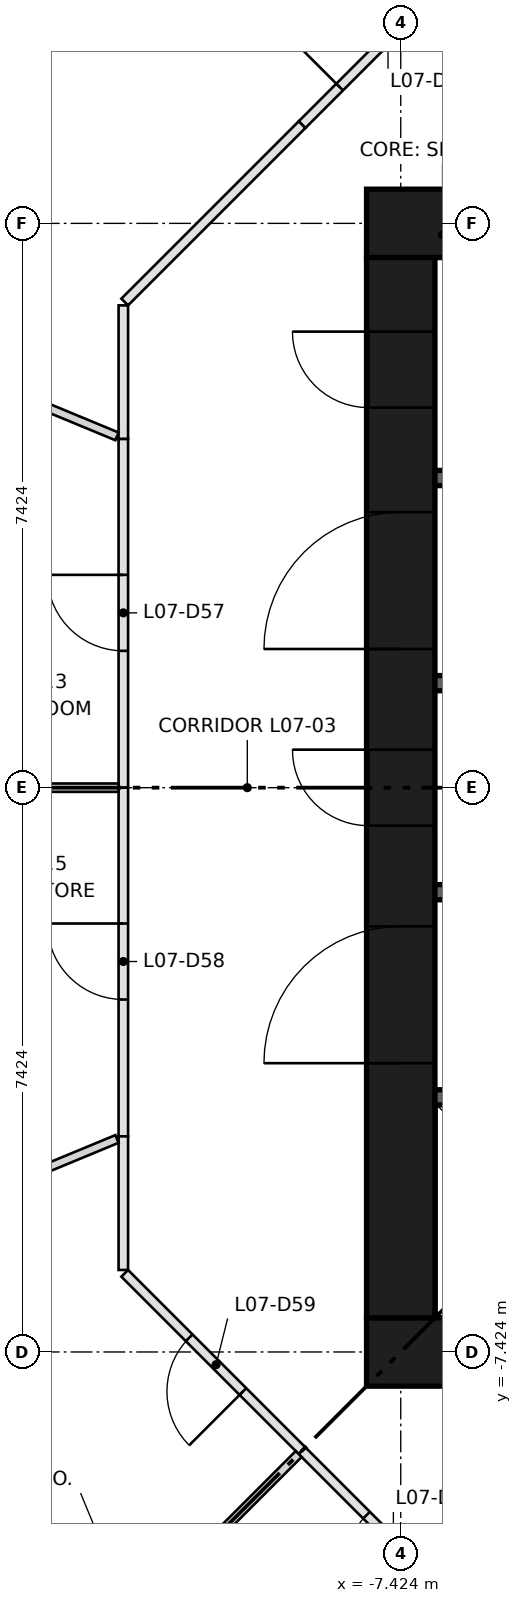
"""IFC4 building model, lengths in metres.
Left out: names, types, materials, properties, quantities, classifications, styles, units other than length and angle.
Written with IfcOpenShell. Run it as: python <this file> out.ifc"""

import sys

from ifc_helpers import new_model, si_unit, direction, frame, frame_2d, origin, place, context, subcontext, project, spatial, rectangle, extrude, element, fill, save


model = new_model("IFC4")
c1 = context("Model", 3, precision=1e-05, world=origin(), true_north=direction((0.0, 1.0)))
c2 = subcontext(c1, "Body", "Model", "MODEL_VIEW")
j1 = project(units=[si_unit("LENGTHUNIT", "METRE"), si_unit("PLANEANGLEUNIT", "RADIAN")], contexts=[c1])
p1 = place(None, origin())
s1 = spatial("IfcSite", under=j1, at=p1, CompositionType="ELEMENT")
p2 = place(p1, origin())
s2 = spatial("IfcBuilding", under=s1, at=p2, CompositionType="ELEMENT")
p3 = place(p2, frame((0.0, 0.0, 29.85)))
s3 = spatial("IfcBuildingStorey", under=s2, at=p3, CompositionType="ELEMENT", Elevation=29.85)
for number, where, z_axis, x_axis in (
    (1, (-7.874, -7.424, 0.0), (0.0, 0.0, 1.0), (1.0, 0.0, 0.0)),
    (2, (-7.874, 7.424, 0.0), (0.0, 0.0, 1.0), (1.0, 0.0, 0.0)),
):
    element("IfcWall", number, at=place(p3, frame(where, z_axis=z_axis, x_axis=x_axis)), inside=s3, PredefinedType="SHEAR", context=c2, shape_type="SweptSolid", body=[
        extrude(rectangle(XDim=15.748, YDim=0.9, at=frame_2d((7.874, 0.0))), origin(), (0.0, 0.0, 1.0), 3.65),
    ])
p4 = place(p3, frame((-7.424, -6.974, 0.0), z_axis=(0.0, 0.0, 1.0), x_axis=(0.0, 1.0, 0.0)))
e3 = element("IfcWall", 3, at=p4, inside=s3, PredefinedType="SHEAR", context=c2, shape_type="SweptSolid", body=[
    extrude(rectangle(XDim=13.948, YDim=0.9, at=frame_2d((6.974, 0.0))), origin(), (0.0, 0.0, 1.0), 3.65),
])
p5 = place(p4, frame((6.474, 0.0, 0.0)))
e4 = element("IfcOpeningElement", 4, at=p5, cuts=e3, PredefinedType="OPENING", context=c2, shape_type="SweptSolid", body=[
    extrude(rectangle(XDim=1.0, YDim=2.1, at=frame_2d((0.5, 1.05))), frame((0.0, 0.46, 0.0), z_axis=(0.0, -1.0, 0.0), x_axis=(1.0, 0.0, 0.0)), (0.0, 0.0, 1.0), 0.92),
])
p6 = place(p4, frame((3.35, 0.0, 0.0)))
e5 = element("IfcOpeningElement", 5, at=p6, cuts=e3, PredefinedType="OPENING", context=c2, shape_type="SweptSolid", body=[
    extrude(rectangle(XDim=1.8, YDim=2.1, at=frame_2d((0.9, 1.05))), frame((0.0, 0.46, 0.0), z_axis=(0.0, -1.0, 0.0), x_axis=(1.0, 0.0, 0.0)), (0.0, 0.0, 1.0), 0.92),
])
p7 = place(p4, frame((8.799, 0.0, 0.0)))
e6 = element("IfcOpeningElement", 6, at=p7, cuts=e3, PredefinedType="OPENING", context=c2, shape_type="SweptSolid", body=[
    extrude(rectangle(XDim=1.8, YDim=2.1, at=frame_2d((0.9, 1.05))), frame((0.0, 0.46, 0.0), z_axis=(0.0, -1.0, 0.0), x_axis=(1.0, 0.0, 0.0)), (0.0, 0.0, 1.0), 0.92),
])
p8 = place(p4, frame((11.974, 0.0, 0.0)))
e7 = element("IfcOpeningElement", 7, at=p8, cuts=e3, PredefinedType="OPENING", context=c2, shape_type="SweptSolid", body=[
    extrude(rectangle(XDim=1.0, YDim=2.1, at=frame_2d((0.5, 1.05))), frame((0.0, 0.46, 0.0), z_axis=(0.0, -1.0, 0.0), x_axis=(1.0, 0.0, 0.0)), (0.0, 0.0, 1.0), 0.92),
])
p9 = place(p3, frame((-6.974, -4.074, 0.0), z_axis=(0.0, 0.0, 1.0), x_axis=(1.0, 0.0, 0.0)))
e8 = element("IfcWall", 8, at=p9, inside=s3, PredefinedType="SHEAR", context=c2, shape_type="SweptSolid", body=[
    extrude(rectangle(XDim=13.948, YDim=0.2, at=frame_2d((6.974, 0.0))), origin(), (0.0, 0.0, 1.0), 3.3),
])
p10 = place(p9, frame((0.918, 0.0, 0.0)))
e9 = element("IfcOpeningElement", 9, at=p10, cuts=e8, PredefinedType="OPENING", context=c2, shape_type="SweptSolid", body=[
    extrude(rectangle(XDim=1.1, YDim=2.1, at=frame_2d((0.55, 1.05))), frame((0.0, 0.11, 0.0), z_axis=(0.0, -1.0, 0.0), x_axis=(1.0, 0.0, 0.0)), (0.0, 0.0, 1.0), 0.22),
])
p11 = place(p9, frame((4.055, 0.0, 0.0)))
e10 = element("IfcOpeningElement", 10, at=p11, cuts=e8, PredefinedType="OPENING", context=c2, shape_type="SweptSolid", body=[
    extrude(rectangle(XDim=1.1, YDim=2.1, at=frame_2d((0.55, 1.05))), frame((0.0, 0.11, 0.0), z_axis=(0.0, -1.0, 0.0), x_axis=(1.0, 0.0, 0.0)), (0.0, 0.0, 1.0), 0.22),
])
p12 = place(p9, frame((6.658, 0.0, 0.0)))
e11 = element("IfcOpeningElement", 11, at=p12, cuts=e8, PredefinedType="OPENING", context=c2, shape_type="SweptSolid", body=[
    extrude(rectangle(XDim=1.0, YDim=2.1, at=frame_2d((0.5, 1.05))), frame((0.0, 0.11, 0.0), z_axis=(0.0, -1.0, 0.0), x_axis=(1.0, 0.0, 0.0)), (0.0, 0.0, 1.0), 0.22),
])
p13 = place(p9, frame((8.627, 0.0, 0.0)))
e12 = element("IfcOpeningElement", 12, at=p13, cuts=e8, PredefinedType="OPENING", context=c2, shape_type="SweptSolid", body=[
    extrude(rectangle(XDim=1.0, YDim=2.1, at=frame_2d((0.5, 1.05))), frame((0.0, 0.11, 0.0), z_axis=(0.0, -1.0, 0.0), x_axis=(1.0, 0.0, 0.0)), (0.0, 0.0, 1.0), 0.22),
])
p14 = place(p9, frame((10.595, 0.0, 0.0)))
e13 = element("IfcOpeningElement", 13, at=p14, cuts=e8, PredefinedType="OPENING", context=c2, shape_type="SweptSolid", body=[
    extrude(rectangle(XDim=1.0, YDim=2.1, at=frame_2d((0.5, 1.05))), frame((0.0, 0.11, 0.0), z_axis=(0.0, -1.0, 0.0), x_axis=(1.0, 0.0, 0.0)), (0.0, 0.0, 1.0), 0.22),
])
p15 = place(p9, frame((12.564, 0.0, 0.0)))
e14 = element("IfcOpeningElement", 14, at=p15, cuts=e8, PredefinedType="OPENING", context=c2, shape_type="SweptSolid", body=[
    extrude(rectangle(XDim=1.0, YDim=2.1, at=frame_2d((0.5, 1.05))), frame((0.0, 0.11, 0.0), z_axis=(0.0, -1.0, 0.0), x_axis=(1.0, 0.0, 0.0)), (0.0, 0.0, 1.0), 0.22),
])
p16 = place(p3, frame((-6.974, 4.074, 0.0), z_axis=(0.0, 0.0, 1.0), x_axis=(1.0, 0.0, 0.0)))
e15 = element("IfcWall", 15, at=p16, inside=s3, PredefinedType="SHEAR", context=c2, shape_type="SweptSolid", body=[
    extrude(rectangle(XDim=6.974, YDim=0.2, at=frame_2d((3.487, 0.0))), origin(), (0.0, 0.0, 1.0), 3.3),
])
for number, where, z_axis, x_axis in (
    (16, (-6.974, -1.375, 0.0), (0.0, 0.0, 1.0), (1.0, 0.0, 0.0)),
    (17, (-6.974, 1.375, 0.0), (0.0, 0.0, 1.0), (1.0, 0.0, 0.0)),
):
    element("IfcWall", number, at=place(p3, frame(where, z_axis=z_axis, x_axis=x_axis)), inside=s3, PredefinedType="SHEAR", context=c2, shape_type="SweptSolid", body=[
        extrude(rectangle(XDim=2.6, YDim=0.2, at=frame_2d((1.3, 0.0))), origin(), (0.0, 0.0, 1.0), 3.3),
    ])
p17 = place(p3, frame((-8.722, 8.722, 0.0), z_axis=(0.0, 0.0, 1.0), x_axis=(0.707069784102, 0.707143776336, 0.0)))
e18 = element("IfcWall", 18, at=p17, inside=s3, PredefinedType="PARTITIONING", context=c2, shape_type="SweptSolid", body=[
    extrude(rectangle(XDim=3.3, YDim=0.125, at=frame_2d((1.65, 0.0))), origin(), (0.0, 0.0, 1.0), 3.3),
])
p18 = place(p17, frame((0.7, 0.0, 0.0)))
e19 = element("IfcOpeningElement", 19, at=p18, cuts=e18, PredefinedType="OPENING", context=c2, shape_type="SweptSolid", body=[
    extrude(rectangle(XDim=1.8, YDim=2.1, at=frame_2d((0.9, 1.05))), frame((0.0, 0.073, 0.0), z_axis=(0.0, -1.0, 0.0), x_axis=(1.0, 0.0, 0.0)), (0.0, 0.0, 1.0), 0.145),
])
p19 = place(p3, frame((-11.074, 4.587, 0.0), z_axis=(0.0, 0.0, 1.0), x_axis=(0.0, 1.0, 0.0)))
e20 = element("IfcWall", 20, at=p19, inside=s3, PredefinedType="PARTITIONING", context=c2, shape_type="SweptSolid", body=[
    extrude(rectangle(XDim=1.758, YDim=0.125, at=frame_2d((0.879, 0.0))), origin(), (0.0, 0.0, 1.0), 3.3),
])
p20 = place(p3, frame((-11.056, 6.389, 0.0), z_axis=(0.0, 0.0, 1.0), x_axis=(0.707143776336, 0.707069784102, 0.0)))
e21 = element("IfcWall", 21, at=p20, inside=s3, PredefinedType="PARTITIONING", context=c2, shape_type="SweptSolid", body=[
    extrude(rectangle(XDim=3.3, YDim=0.125, at=frame_2d((1.65, 0.0))), origin(), (0.0, 0.0, 1.0), 3.3),
])
p21 = place(p3, frame((-11.074, 0.0, 0.0), z_axis=(0.0, 0.0, 1.0), x_axis=(0.0, 1.0, 0.0)))
e22 = element("IfcWall", 22, at=p21, inside=s3, PredefinedType="PARTITIONING", context=c2, shape_type="SweptSolid", body=[
    extrude(rectangle(XDim=4.587, YDim=0.125, at=frame_2d((2.293, 0.0))), origin(), (0.0, 0.0, 1.0), 3.3),
])
p22 = place(p21, frame((1.8, 0.0, 0.0)))
e23 = element("IfcOpeningElement", 23, at=p22, cuts=e22, PredefinedType="OPENING", context=c2, shape_type="SweptSolid", body=[
    extrude(rectangle(XDim=1.0, YDim=2.1, at=frame_2d((0.5, 1.05))), frame((0.0, 0.073, 0.0), z_axis=(0.0, -1.0, 0.0), x_axis=(1.0, 0.0, 0.0)), (0.0, 0.0, 1.0), 0.145),
])
p23 = place(p3, frame((-11.074, -4.587, 0.0), z_axis=(0.0, 0.0, 1.0), x_axis=(0.0, 1.0, 0.0)))
e24 = element("IfcWall", 24, at=p23, inside=s3, PredefinedType="PARTITIONING", context=c2, shape_type="SweptSolid", body=[
    extrude(rectangle(XDim=4.587, YDim=0.125, at=frame_2d((2.293, 0.0))), origin(), (0.0, 0.0, 1.0), 3.3),
])
p24 = place(p23, frame((1.8, 0.0, 0.0)))
e25 = element("IfcOpeningElement", 25, at=p24, cuts=e24, PredefinedType="OPENING", context=c2, shape_type="SweptSolid", body=[
    extrude(rectangle(XDim=1.0, YDim=2.1, at=frame_2d((0.5, 1.05))), frame((0.0, 0.073, 0.0), z_axis=(0.0, -1.0, 0.0), x_axis=(1.0, 0.0, 0.0)), (0.0, 0.0, 1.0), 0.145),
])
p25 = place(p3, frame((-11.074, -6.345, 0.0), z_axis=(0.0, 0.0, 1.0), x_axis=(0.0, 1.0, 0.0)))
e26 = element("IfcWall", 26, at=p25, inside=s3, PredefinedType="PARTITIONING", context=c2, shape_type="SweptSolid", body=[
    extrude(rectangle(XDim=1.758, YDim=0.125, at=frame_2d((0.879, 0.0))), origin(), (0.0, 0.0, 1.0), 3.3),
])
p26 = place(p3, frame((-8.722, -8.722, 0.0), z_axis=(0.0, 0.0, 1.0), x_axis=(-0.707143776336, 0.707069784102, 0.0)))
e27 = element("IfcWall", 27, at=p26, inside=s3, PredefinedType="PARTITIONING", context=c2, shape_type="SweptSolid", body=[
    extrude(rectangle(XDim=3.3, YDim=0.125, at=frame_2d((1.65, 0.0))), origin(), (0.0, 0.0, 1.0), 3.3),
])
p27 = place(p26, frame((1.1, 0.0, 0.0)))
e28 = element("IfcOpeningElement", 28, at=p27, cuts=e27, PredefinedType="OPENING", context=c2, shape_type="SweptSolid", body=[
    extrude(rectangle(XDim=1.0, YDim=2.1, at=frame_2d((0.5, 1.05))), frame((0.0, 0.073, 0.0), z_axis=(0.0, -1.0, 0.0), x_axis=(1.0, 0.0, 0.0)), (0.0, 0.0, 1.0), 0.145),
])
p28 = place(p3, frame((-6.389, -11.056, 0.0), z_axis=(0.0, 0.0, 1.0), x_axis=(-0.707069784102, 0.707143776336, 0.0)))
e29 = element("IfcWall", 29, at=p28, inside=s3, PredefinedType="PARTITIONING", context=c2, shape_type="SweptSolid", body=[
    extrude(rectangle(XDim=3.3, YDim=0.125, at=frame_2d((1.65, 0.0))), origin(), (0.0, 0.0, 1.0), 3.3),
])
p29 = place(p28, frame((1.1, 0.0, 0.0)))
e30 = element("IfcOpeningElement", 30, at=p29, cuts=e29, PredefinedType="OPENING", context=c2, shape_type="SweptSolid", body=[
    extrude(rectangle(XDim=1.0, YDim=2.1, at=frame_2d((0.5, 1.05))), frame((0.0, 0.073, 0.0), z_axis=(0.0, -1.0, 0.0), x_axis=(1.0, 0.0, 0.0)), (0.0, 0.0, 1.0), 0.145),
])
p30 = place(p3, frame((-11.157, 4.622, 0.0), z_axis=(0.0, 0.0, 1.0), x_axis=(-0.923876757744, 0.382690131178, 0.0)))
e31 = element("IfcWall", 31, at=p30, inside=s3, PredefinedType="PARTITIONING", context=c2, shape_type="SweptSolid", body=[
    extrude(rectangle(XDim=1.423, YDim=0.11, at=frame_2d((0.712, 0.0))), origin(), (0.0, 0.0, 1.0), 3.3),
])
p31 = place(p3, frame((-11.136, 0.0, 0.0), z_axis=(0.0, 0.0, 1.0), x_axis=(-1.0, 0.0, 0.0)))
e32 = element("IfcWall", 32, at=p31, inside=s3, PredefinedType="PARTITIONING", context=c2, shape_type="SweptSolid", body=[
    extrude(rectangle(XDim=2.305, YDim=0.11, at=frame_2d((1.152, 0.0))), origin(), (0.0, 0.0, 1.0), 3.3),
])
p32 = place(p3, frame((-11.157, -4.622, 0.0), z_axis=(0.0, 0.0, 1.0), x_axis=(-0.923876757744, -0.382690131178, 0.0)))
e33 = element("IfcWall", 33, at=p32, inside=s3, PredefinedType="PARTITIONING", context=c2, shape_type="SweptSolid", body=[
    extrude(rectangle(XDim=1.423, YDim=0.11, at=frame_2d((0.712, 0.0))), origin(), (0.0, 0.0, 1.0), 3.3),
])
p33 = place(p3, frame((-13.131, -13.131, 0.0), z_axis=(0.0, 0.0, 1.0), x_axis=(0.707106781187, 0.707106781187, 0.0)))
e34 = element("IfcWall", 34, at=p33, inside=s3, PredefinedType="PARTITIONING", context=c2, shape_type="SweptSolid", body=[
    extrude(rectangle(XDim=6.172, YDim=0.11, at=frame_2d((3.086, 0.0))), origin(), (0.0, 0.0, 1.0), 3.3),
])
p34 = place(p5, origin())
e35 = element("IfcDoor", 35, at=p34, inside=s3, OperationType="SINGLE_SWING_RIGHT", PredefinedType="DOOR", context=c2, shape_type="SweptSolid", body=[
    extrude(rectangle(XDim=1.0, YDim=2.1, at=frame_2d((0.5, 1.05))), frame((0.0, 0.45, 0.0), z_axis=(0.0, -1.0, 0.0), x_axis=(1.0, 0.0, 0.0)), (0.0, 0.0, 1.0), 0.05),
])
fill(e4, e35)
p35 = place(p6, origin())
e36 = element("IfcDoor", 36, at=p35, inside=s3, OperationType="DOUBLE_DOOR_SINGLE_SWING", PredefinedType="DOOR", context=c2, shape_type="SweptSolid", body=[
    extrude(rectangle(XDim=1.8, YDim=2.1, at=frame_2d((0.9, 1.05))), frame((0.0, 0.025, 0.0), z_axis=(0.0, -1.0, 0.0), x_axis=(1.0, 0.0, 0.0)), (0.0, 0.0, 1.0), 0.05),
])
fill(e5, e36)
p36 = place(p7, origin())
e37 = element("IfcDoor", 37, at=p36, inside=s3, OperationType="DOUBLE_DOOR_SINGLE_SWING", PredefinedType="DOOR", context=c2, shape_type="SweptSolid", body=[
    extrude(rectangle(XDim=1.8, YDim=2.1, at=frame_2d((0.9, 1.05))), frame((0.0, 0.025, 0.0), z_axis=(0.0, -1.0, 0.0), x_axis=(1.0, 0.0, 0.0)), (0.0, 0.0, 1.0), 0.05),
])
fill(e6, e37)
p37 = place(p8, origin())
e38 = element("IfcDoor", 38, at=p37, inside=s3, OperationType="SINGLE_SWING_RIGHT", PredefinedType="DOOR", context=c2, shape_type="SweptSolid", body=[
    extrude(rectangle(XDim=1.0, YDim=2.1, at=frame_2d((0.5, 1.05))), frame((0.0, 0.45, 0.0), z_axis=(0.0, -1.0, 0.0), x_axis=(1.0, 0.0, 0.0)), (0.0, 0.0, 1.0), 0.05),
])
fill(e7, e38)
p38 = place(p18, origin())
e39 = element("IfcDoor", 39, at=p38, inside=s3, OperationType="DOUBLE_DOOR_SINGLE_SWING", PredefinedType="DOOR", context=c2, shape_type="SweptSolid", body=[
    extrude(rectangle(XDim=1.8, YDim=2.1, at=frame_2d((0.9, 1.05))), frame((0.0, 0.025, 0.0), z_axis=(0.0, -1.0, 0.0), x_axis=(1.0, 0.0, 0.0)), (0.0, 0.0, 1.0), 0.05),
])
fill(e19, e39)
p39 = place(p22, origin())
e40 = element("IfcDoor", 40, at=p39, inside=s3, OperationType="SINGLE_SWING_RIGHT", PredefinedType="DOOR", context=c2, shape_type="SweptSolid", body=[
    extrude(rectangle(XDim=1.0, YDim=2.1, at=frame_2d((0.5, 1.05))), frame((0.0, 0.025, 0.0), z_axis=(0.0, -1.0, 0.0), x_axis=(1.0, 0.0, 0.0)), (0.0, 0.0, 1.0), 0.05),
])
fill(e23, e40)
p40 = place(p24, origin())
e41 = element("IfcDoor", 41, at=p40, inside=s3, OperationType="SINGLE_SWING_RIGHT", PredefinedType="DOOR", context=c2, shape_type="SweptSolid", body=[
    extrude(rectangle(XDim=1.0, YDim=2.1, at=frame_2d((0.5, 1.05))), frame((0.0, 0.025, 0.0), z_axis=(0.0, -1.0, 0.0), x_axis=(1.0, 0.0, 0.0)), (0.0, 0.0, 1.0), 0.05),
])
fill(e25, e41)
p41 = place(p27, origin())
e42 = element("IfcDoor", 42, at=p41, inside=s3, OperationType="SINGLE_SWING_LEFT", PredefinedType="DOOR", context=c2, shape_type="SweptSolid", body=[
    extrude(rectangle(XDim=1.0, YDim=2.1, at=frame_2d((0.5, 1.05))), frame((0.0, 0.025, 0.0), z_axis=(0.0, -1.0, 0.0), x_axis=(1.0, 0.0, 0.0)), (0.0, 0.0, 1.0), 0.05),
])
fill(e28, e42)
p42 = place(p29, origin())
e43 = element("IfcDoor", 43, at=p42, inside=s3, OperationType="SINGLE_SWING_LEFT", PredefinedType="DOOR", context=c2, shape_type="SweptSolid", body=[
    extrude(rectangle(XDim=1.0, YDim=2.1, at=frame_2d((0.5, 1.05))), frame((0.0, 0.025, 0.0), z_axis=(0.0, -1.0, 0.0), x_axis=(1.0, 0.0, 0.0)), (0.0, 0.0, 1.0), 0.05),
])
fill(e30, e43)
save(model, sys.argv[1])
